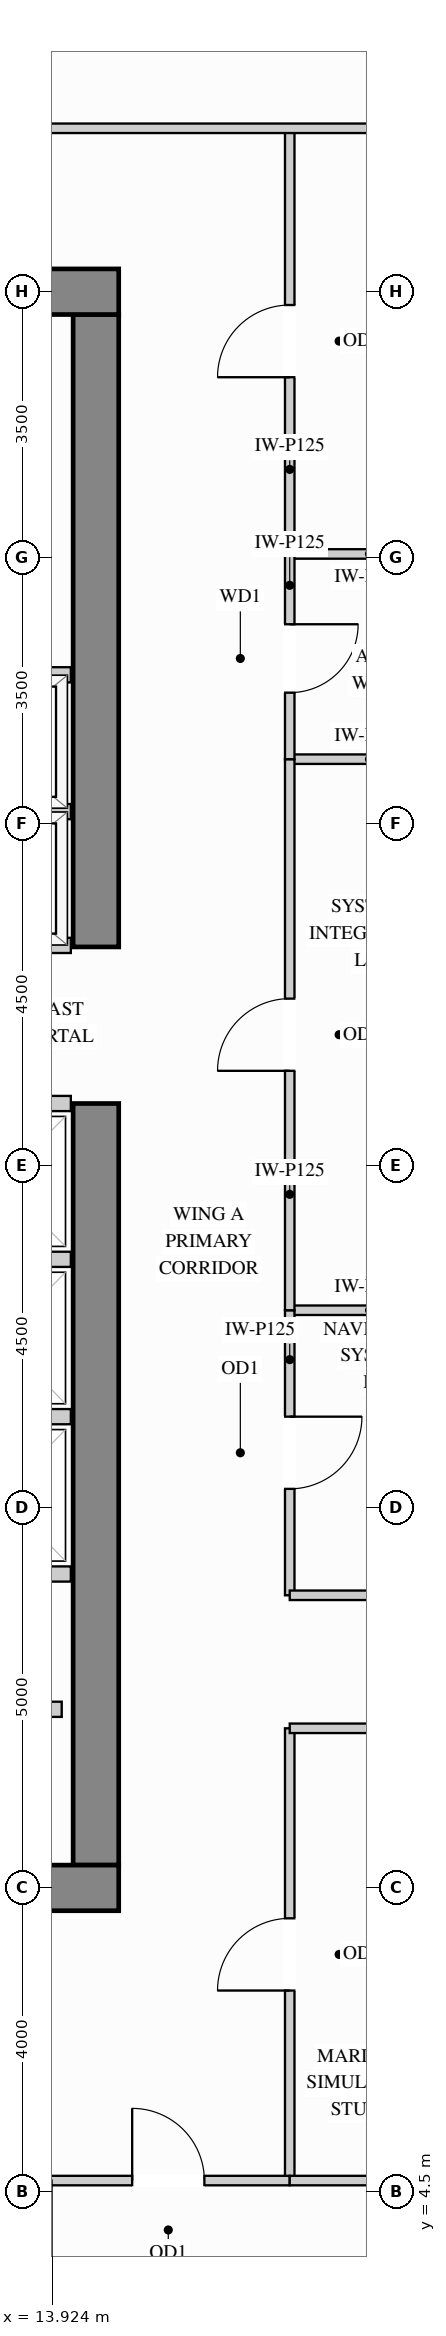
"""IFC4 building model, lengths in metres.
Left out: names, types, materials, properties, quantities, classifications, styles, units other than length and angle.
Written with IfcOpenShell. Run it as: python <this file> out.ifc"""

import sys

from ifc_helpers import new_model, si_unit, direction, frame, frame_2d, origin, place, context, subcontext, project, spatial, rectangle, extrude, source, transform, mapped, element, fill, save


model = new_model("IFC4")
c1 = context("Model", 3, precision=1e-05, world=origin(), true_north=direction((0.0, 1.0)))
c2 = subcontext(c1, "Body", "Model", "MODEL_VIEW")
j1 = project(units=[si_unit("LENGTHUNIT", "METRE"), si_unit("PLANEANGLEUNIT", "RADIAN")], contexts=[c1])
p1 = place(None, origin())
s1 = spatial("IfcSite", under=j1, at=p1, CompositionType="ELEMENT")
p2 = place(p1, origin())
s2 = spatial("IfcBuilding", under=s1, at=p2, CompositionType="ELEMENT")
p3 = place(p2, frame((0.0, 0.0, 193.5)))
s3 = spatial("IfcBuildingStorey", under=s2, at=p3, CompositionType="ELEMENT", Elevation=193.5)
m1 = source(origin(), c2, "Body", "SweptSolid", [
    extrude(rectangle(XDim=10.02, YDim=0.6, at=frame_2d((5.01, 0.0))), origin(), (0.0, 0.0, 1.0), 3.4),
])
p4 = place(p3, frame((14.5, 8.8, 0.0), z_axis=(0.0, 0.0, 1.0), x_axis=(0.0, 1.0, 0.0)))
e1 = element("IfcWall", 1, at=p4, inside=s3, PredefinedType="SHEAR", context=c2, shape_type="MappedRepresentation", body=[
    mapped(m1, transform((0.0, 0.0, 0.0), x_axis=(1.0, 0.0, 0.0), y_axis=(0.0, 1.0, 0.0), z_axis=(0.0, 0.0, 1.0))),
])
m2 = source(origin(), c2, "Body", "SweptSolid", [
    extrude(rectangle(XDim=8.32, YDim=0.6, at=frame_2d((4.16, 0.0))), origin(), (0.0, 0.0, 1.0), 3.4),
])
p5 = place(p3, frame((14.5, 20.88, 0.0), z_axis=(0.0, 0.0, 1.0), x_axis=(0.0, 1.0, 0.0)))
e2 = element("IfcWall", 2, at=p5, inside=s3, PredefinedType="SHEAR", context=c2, shape_type="MappedRepresentation", body=[
    mapped(m2, transform((0.0, 0.0, 0.0), x_axis=(1.0, 0.0, 0.0), y_axis=(0.0, 1.0, 0.0), z_axis=(0.0, 0.0, 1.0))),
])
m3 = source(origin(), c2, "Body", "SweptSolid", [
    extrude(rectangle(XDim=10.6, YDim=0.6, at=frame_2d((5.3, 0.0))), origin(), (0.0, 0.0, 1.0), 3.4),
])
for number, where, z_axis, x_axis in (
    (3, (4.2, 29.5, 0.0), (0.0, 0.0, 1.0), (1.0, 0.0, 0.0)),
    (4, (4.2, 8.5, 0.0), (0.0, 0.0, 1.0), (1.0, 0.0, 0.0)),
):
    element("IfcWall", number, at=place(p3, frame(where, z_axis=z_axis, x_axis=x_axis)), inside=s3, PredefinedType="SHEAR", context=c2, shape_type="MappedRepresentation", body=[
        mapped(m3, transform((0.0, 0.0, 0.0), x_axis=(1.0, 0.0, 0.0), y_axis=(0.0, 1.0, 0.0), z_axis=(0.0, 0.0, 1.0))),
    ])
m4 = source(origin(), c2, "Body", "SweptSolid", [
    extrude(rectangle(XDim=2.1, YDim=0.125, at=frame_2d((1.05, 0.0))), origin(), (0.0, 0.0, 1.0), 3.385),
])
p6 = place(p3, frame((17.05, 16.1, 0.0), z_axis=(0.0, 0.0, 1.0), x_axis=(1.0, 0.0, 0.0)))
e5 = element("IfcWall", 5, at=p6, inside=s3, PredefinedType="PARTITIONING", context=c2, shape_type="MappedRepresentation", body=[
    mapped(m4, transform((0.0, 0.0, 0.0), x_axis=(1.0, 0.0, 0.0), y_axis=(0.0, 1.0, 0.0), z_axis=(0.0, 0.0, 1.0))),
])
m5 = source(origin(), c2, "Body", "SweptSolid", [
    extrude(rectangle(XDim=2.098, YDim=0.125, at=frame_2d((1.049, 0.0))), origin(), (0.0, 0.0, 1.0), 3.385),
])
for number, where, z_axis, x_axis in (
    (6, (17.05, 23.35, 0.0), (0.0, 0.0, 1.0), (1.0, 0.0, 0.0)),
    (7, (17.05, 26.05, 0.0), (0.0, 0.0, 1.0), (1.0, 0.0, 0.0)),
):
    element("IfcWall", number, at=place(p3, frame(where, z_axis=z_axis, x_axis=x_axis)), inside=s3, PredefinedType="PARTITIONING", context=c2, shape_type="MappedRepresentation", body=[
        mapped(m5, transform((0.0, 0.0, 0.0), x_axis=(1.0, 0.0, 0.0), y_axis=(0.0, 1.0, 0.0), z_axis=(0.0, 0.0, 1.0))),
    ])
p7 = place(p3, frame((17.05, 12.35, 0.0), z_axis=(0.0, 0.0, 1.0), x_axis=(0.0, 1.0, 0.0)))
e8 = element("IfcWall", 8, at=p7, inside=s3, PredefinedType="PARTITIONING", context=c2, shape_type="SweptSolid", body=[
    extrude(rectangle(XDim=3.75, YDim=0.125, at=frame_2d((1.875, 0.0))), origin(), (0.0, 0.0, 1.0), 3.385),
])
p8 = place(p7, frame((1.4, 0.0, 0.0)))
e9 = element("IfcOpeningElement", 9, at=p8, cuts=e8, PredefinedType="OPENING", context=c2, shape_type="SweptSolid", body=[
    extrude(rectangle(XDim=0.95, YDim=2.15, at=frame_2d((0.475, 1.075))), frame((0.0, 0.073, 0.0), z_axis=(0.0, -1.0, 0.0), x_axis=(1.0, 0.0, 0.0)), (0.0, 0.0, 1.0), 0.145),
])
p9 = place(p3, frame((17.05, 16.1, 0.0), z_axis=(0.0, 0.0, 1.0), x_axis=(0.0, 1.0, 0.0)))
e10 = element("IfcWall", 10, at=p9, inside=s3, PredefinedType="PARTITIONING", context=c2, shape_type="SweptSolid", body=[
    extrude(rectangle(XDim=7.25, YDim=0.125, at=frame_2d((3.625, 0.0))), origin(), (0.0, 0.0, 1.0), 3.385),
])
p10 = place(p9, frame((3.15, 0.0, 0.0)))
e11 = element("IfcOpeningElement", 11, at=p10, cuts=e10, PredefinedType="OPENING", context=c2, shape_type="SweptSolid", body=[
    extrude(rectangle(XDim=0.95, YDim=2.15, at=frame_2d((0.475, 1.075))), frame((0.0, 0.073, 0.0), z_axis=(0.0, -1.0, 0.0), x_axis=(1.0, 0.0, 0.0)), (0.0, 0.0, 1.0), 0.145),
])
p11 = place(p3, frame((17.05, 26.05, 0.0), z_axis=(0.0, 0.0, 1.0), x_axis=(0.0, 1.0, 0.0)))
e12 = element("IfcWall", 12, at=p11, inside=s3, PredefinedType="PARTITIONING", context=c2, shape_type="SweptSolid", body=[
    extrude(rectangle(XDim=5.6, YDim=0.125, at=frame_2d((2.8, 0.0))), origin(), (0.0, 0.0, 1.0), 3.385),
])
p12 = place(p11, frame((2.325, 0.0, 0.0)))
e13 = element("IfcOpeningElement", 13, at=p12, cuts=e12, PredefinedType="OPENING", context=c2, shape_type="SweptSolid", body=[
    extrude(rectangle(XDim=0.95, YDim=2.15, at=frame_2d((0.475, 1.075))), frame((0.0, 0.073, 0.0), z_axis=(0.0, -1.0, 0.0), x_axis=(1.0, 0.0, 0.0)), (0.0, 0.0, 1.0), 0.145),
])
p13 = place(p3, frame((17.05, 4.65, 0.0), z_axis=(0.0, 0.0, 1.0), x_axis=(0.0, 1.0, 0.0)))
e14 = element("IfcWall", 14, at=p13, inside=s3, PredefinedType="PARTITIONING", context=c2, shape_type="SweptSolid", body=[
    extrude(rectangle(XDim=5.95, YDim=0.125, at=frame_2d((2.975, 0.0))), origin(), (0.0, 0.0, 1.0), 3.385),
])
p14 = place(p13, frame((2.5, 0.0, 0.0)))
e15 = element("IfcOpeningElement", 15, at=p14, cuts=e14, PredefinedType="OPENING", context=c2, shape_type="SweptSolid", body=[
    extrude(rectangle(XDim=0.95, YDim=2.15, at=frame_2d((0.475, 1.075))), frame((0.0, 0.073, 0.0), z_axis=(0.0, -1.0, 0.0), x_axis=(1.0, 0.0, 0.0)), (0.0, 0.0, 1.0), 0.145),
])
p15 = place(p3, frame((17.05, 23.35, 0.0), z_axis=(0.0, 0.0, 1.0), x_axis=(0.0, 1.0, 0.0)))
e16 = element("IfcWall", 16, at=p15, inside=s3, PredefinedType="PARTITIONING", context=c2, shape_type="SweptSolid", body=[
    extrude(rectangle(XDim=2.7, YDim=0.125, at=frame_2d((1.35, 0.0))), origin(), (0.0, 0.0, 1.0), 3.385),
])
p16 = place(p15, frame((0.875, 0.0, 0.0)))
e17 = element("IfcOpeningElement", 17, at=p16, cuts=e16, PredefinedType="OPENING", context=c2, shape_type="SweptSolid", body=[
    extrude(rectangle(XDim=0.9, YDim=2.15, at=frame_2d((0.45, 1.075))), frame((0.0, 0.073, 0.0), z_axis=(0.0, -1.0, 0.0), x_axis=(1.0, 0.0, 0.0)), (0.0, 0.0, 1.0), 0.145),
])
m6 = source(origin(), c2, "Body", "SweptSolid", [
    extrude(rectangle(XDim=12.598, YDim=0.125, at=frame_2d((6.299, 0.0))), origin(), (0.0, 0.0, 1.0), 2.848),
])
p17 = place(p3, frame((6.55, 31.65, 0.0), z_axis=(0.0, 0.0, 1.0), x_axis=(1.0, 0.0, 0.0)))
e18 = element("IfcWall", 18, at=p17, inside=s3, PredefinedType="PARTITIONING", context=c2, shape_type="MappedRepresentation", body=[
    mapped(m6, transform((0.0, 0.0, 0.0), x_axis=(1.0, 0.0, 0.0), y_axis=(0.0, 1.0, 0.0), z_axis=(0.0, 0.0, 1.0))),
])
m7 = source(origin(), c2, "Body", "SweptSolid", [
    extrude(rectangle(XDim=2.45, YDim=0.125, at=frame_2d((1.225, 0.0))), origin(), (0.0, 0.0, 1.0), 3.385),
])
for number, where, z_axis, x_axis in (
    (19, (17.05, 12.35, 0.0), (0.0, 0.0, 1.0), (1.0, 0.0, 0.0)),
    (20, (17.05, 10.6, 0.0), (0.0, 0.0, 1.0), (1.0, 0.0, 0.0)),
):
    element("IfcWall", number, at=place(p3, frame(where, z_axis=z_axis, x_axis=x_axis)), inside=s3, PredefinedType="PARTITIONING", context=c2, shape_type="MappedRepresentation", body=[
        mapped(m7, transform((0.0, 0.0, 0.0), x_axis=(1.0, 0.0, 0.0), y_axis=(0.0, 1.0, 0.0), z_axis=(0.0, 0.0, 1.0))),
    ])
p18 = place(p3, frame((13.854, 4.65, 0.0), z_axis=(0.0, 0.0, 1.0), x_axis=(1.0, 0.0, 0.0)))
e21 = element("IfcWall", 21, at=p18, inside=s3, PredefinedType="PARTITIONING", context=c2, shape_type="SweptSolid", body=[
    extrude(rectangle(XDim=3.196, YDim=0.125, at=frame_2d((1.598, 0.0))), origin(), (0.0, 0.0, 1.0), 2.848),
])
p19 = place(p18, frame((1.123, 0.0, 0.0)))
e22 = element("IfcOpeningElement", 22, at=p19, cuts=e21, PredefinedType="OPENING", context=c2, shape_type="SweptSolid", body=[
    extrude(rectangle(XDim=0.95, YDim=2.15, at=frame_2d((0.475, 1.075))), frame((0.0, 0.073, 0.0), z_axis=(0.0, -1.0, 0.0), x_axis=(1.0, 0.0, 0.0)), (0.0, 0.0, 1.0), 0.145),
])
m8 = source(origin(), c2, "Body", "SweptSolid", [
    extrude(rectangle(XDim=2.098, YDim=0.125, at=frame_2d((1.049, 0.0))), origin(), (0.0, 0.0, 1.0), 2.848),
])
p20 = place(p3, frame((17.05, 4.65, 0.0), z_axis=(0.0, 0.0, 1.0), x_axis=(1.0, 0.0, 0.0)))
e23 = element("IfcWall", 23, at=p20, inside=s3, PredefinedType="PARTITIONING", context=c2, shape_type="MappedRepresentation", body=[
    mapped(m8, transform((0.0, 0.0, 0.0), x_axis=(1.0, 0.0, 0.0), y_axis=(0.0, 1.0, 0.0), z_axis=(0.0, 0.0, 1.0))),
])
m9 = source(origin(), c2, "Body", "SweptSolid", [
    extrude(rectangle(XDim=1.63, YDim=0.2, at=frame_2d((0.815, 0.0))), origin(), (0.0, 0.0, 1.0), 3.385),
])
p21 = place(p3, frame((12.42, 10.85, 0.0), z_axis=(0.0, 0.0, 1.0), x_axis=(1.0, 0.0, 0.0)))
e24 = element("IfcWall", 24, at=p21, inside=s3, PredefinedType="PARTITIONING", context=c2, shape_type="MappedRepresentation", body=[
    mapped(m9, transform((0.0, 0.0, 0.0), x_axis=(1.0, 0.0, 0.0), y_axis=(0.0, 1.0, 0.0), z_axis=(0.0, 0.0, 1.0))),
])
m10 = source(origin(), c2, "Body", "SweptSolid", [
    extrude(rectangle(XDim=2.34, YDim=0.2, at=frame_2d((1.17, 0.0))), origin(), (0.0, 0.0, 1.0), 3.385),
])
for number, where, z_axis, x_axis in (
    (25, (11.83, 22.66, 0.0), (0.0, 0.0, 1.0), (1.0, 0.0, 0.0)),
    (26, (11.83, 20.9, 0.0), (0.0, 0.0, 1.0), (1.0, 0.0, 0.0)),
    (27, (11.83, 24.46, 0.0), (0.0, 0.0, 1.0), (1.0, 0.0, 0.0)),
):
    element("IfcWall", number, at=place(p3, frame(where, z_axis=z_axis, x_axis=x_axis)), inside=s3, PredefinedType="PARTITIONING", context=c2, shape_type="MappedRepresentation", body=[
        mapped(m10, transform((0.0, 0.0, 0.0), x_axis=(1.0, 0.0, 0.0), y_axis=(0.0, 1.0, 0.0), z_axis=(0.0, 0.0, 1.0))),
    ])
m11 = source(origin(), c2, "Body", "SweptSolid", [
    extrude(rectangle(XDim=1.94, YDim=0.2, at=frame_2d((0.97, 0.0))), origin(), (0.0, 0.0, 1.0), 3.385),
])
for number, where, z_axis, x_axis in (
    (28, (12.23, 14.7, 0.0), (0.0, 0.0, 1.0), (1.0, 0.0, 0.0)),
    (29, (12.23, 12.63, 0.0), (0.0, 0.0, 1.0), (1.0, 0.0, 0.0)),
    (30, (12.23, 16.77, 0.0), (0.0, 0.0, 1.0), (1.0, 0.0, 0.0)),
    (31, (12.23, 18.82, 0.0), (0.0, 0.0, 1.0), (1.0, 0.0, 0.0)),
):
    element("IfcWall", number, at=place(p3, frame(where, z_axis=z_axis, x_axis=x_axis)), inside=s3, PredefinedType="PARTITIONING", context=c2, shape_type="MappedRepresentation", body=[
        mapped(m11, transform((0.0, 0.0, 0.0), x_axis=(1.0, 0.0, 0.0), y_axis=(0.0, 1.0, 0.0), z_axis=(0.0, 0.0, 1.0))),
    ])
m12 = source(origin(), c2, "Body", "SweptSolid", [
    extrude(rectangle(XDim=0.95, YDim=2.15, at=frame_2d((0.475, 1.075))), frame((0.0, 0.025, 0.0), z_axis=(0.0, -1.0, 0.0), x_axis=(1.0, 0.0, 0.0)), (0.0, 0.0, 1.0), 0.05),
])
p22 = place(p14, origin())
e32 = element("IfcDoor", 32, at=p22, inside=s3, OperationType="SINGLE_SWING_LEFT", PredefinedType="DOOR", context=c2, shape_type="MappedRepresentation", body=[
    mapped(m12, transform((0.0, 0.0, 0.0), x_axis=(1.0, 0.0, 0.0), y_axis=(0.0, 1.0, 0.0), z_axis=(0.0, 0.0, 1.0))),
])
fill(e15, e32)
p23 = place(p8, origin())
e33 = element("IfcDoor", 33, at=p23, inside=s3, OperationType="SINGLE_SWING_RIGHT", PredefinedType="DOOR", context=c2, shape_type="MappedRepresentation", body=[
    mapped(m12, transform((0.0, 0.0, 0.0), x_axis=(1.0, 0.0, 0.0), y_axis=(0.0, 1.0, 0.0), z_axis=(0.0, 0.0, 1.0))),
])
fill(e9, e33)
p24 = place(p10, origin())
e34 = element("IfcDoor", 34, at=p24, inside=s3, OperationType="SINGLE_SWING_LEFT", PredefinedType="DOOR", context=c2, shape_type="MappedRepresentation", body=[
    mapped(m12, transform((0.0, 0.0, 0.0), x_axis=(1.0, 0.0, 0.0), y_axis=(0.0, 1.0, 0.0), z_axis=(0.0, 0.0, 1.0))),
])
fill(e11, e34)
p25 = place(p12, origin())
e35 = element("IfcDoor", 35, at=p25, inside=s3, OperationType="SINGLE_SWING_LEFT", PredefinedType="DOOR", context=c2, shape_type="MappedRepresentation", body=[
    mapped(m12, transform((0.0, 0.0, 0.0), x_axis=(1.0, 0.0, 0.0), y_axis=(0.0, 1.0, 0.0), z_axis=(0.0, 0.0, 1.0))),
])
fill(e13, e35)
p26 = place(p19, origin())
e36 = element("IfcDoor", 36, at=p26, inside=s3, OperationType="SINGLE_SWING_LEFT", PredefinedType="DOOR", context=c2, shape_type="MappedRepresentation", body=[
    mapped(m12, transform((0.0, 0.0, 0.0), x_axis=(1.0, 0.0, 0.0), y_axis=(0.0, 1.0, 0.0), z_axis=(0.0, 0.0, 1.0))),
])
fill(e22, e36)
m13 = source(origin(), c2, "Body", "SweptSolid", [
    extrude(rectangle(XDim=0.9, YDim=2.15, at=frame_2d((0.45, 1.075))), frame((0.0, 0.025, 0.0), z_axis=(0.0, -1.0, 0.0), x_axis=(1.0, 0.0, 0.0)), (0.0, 0.0, 1.0), 0.05),
])
p27 = place(p16, origin())
e37 = element("IfcDoor", 37, at=p27, inside=s3, OperationType="SINGLE_SWING_RIGHT", PredefinedType="DOOR", context=c2, shape_type="MappedRepresentation", body=[
    mapped(m13, transform((0.0, 0.0, 0.0), x_axis=(1.0, 0.0, 0.0), y_axis=(0.0, 1.0, 0.0), z_axis=(0.0, 0.0, 1.0))),
])
fill(e17, e37)
save(model, sys.argv[1])
